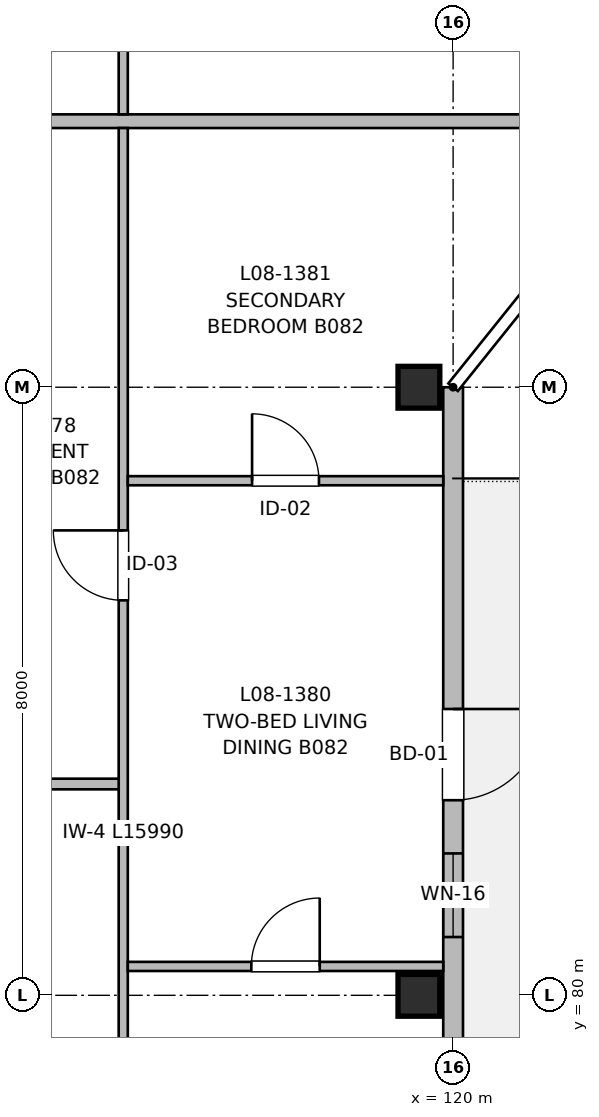
"""IFC4 building model, lengths in metres.
Left out: names, types, materials, properties, quantities, classifications, styles, units other than length and angle.
Written with IfcOpenShell. Run it as: python <this file> out.ifc"""

import sys

from ifc_helpers import new_model, si_unit, direction, frame, frame_2d, origin, origin_2d, place, context, subcontext, project, spatial, rectangle, extrude, element, fill, save


model = new_model("IFC4")
c1 = context("Model", 3, precision=1e-05, world=origin(), true_north=direction((0.0, 1.0)))
c2 = subcontext(c1, "Body", "Model", "MODEL_VIEW")
j1 = project(units=[si_unit("LENGTHUNIT", "METRE"), si_unit("PLANEANGLEUNIT", "RADIAN")], contexts=[c1])
p1 = place(None, origin())
s1 = spatial("IfcSite", under=j1, at=p1, CompositionType="ELEMENT")
p2 = place(p1, origin())
s2 = spatial("IfcBuilding", under=s1, at=p2, CompositionType="ELEMENT")
p3 = place(p2, frame((0.0, 0.0, 26.56)))
s3 = spatial("IfcBuildingStorey", under=s2, at=p3, CompositionType="ELEMENT", Elevation=26.56)
for number, where, z_axis, x_axis in (
    (1, (119.55, 80.0, 0.0), (0.0, 0.0, 1.0), (1.0, 0.0, 0.0)),
    (2, (119.55, 88.0, 0.0), (0.0, 0.0, 1.0), (1.0, 0.0, 0.0)),
):
    element("IfcColumn", number, at=place(p3, frame(where, z_axis=z_axis, x_axis=x_axis)), inside=s3, PredefinedType="COLUMN", context=c2, shape_type="SweptSolid", body=[
        extrude(rectangle(XDim=0.55, YDim=0.55, at=origin_2d()), origin(), (0.0, 0.0, 1.0), 3.2),
    ])
p4 = place(p3, frame((120.0, 88.0, 0.0), z_axis=(0.0, 0.0, 1.0), x_axis=(0.0, -1.0, 0.0)))
e3 = element("IfcWall", 3, at=p4, inside=s3, PredefinedType="SOLIDWALL", context=c2, shape_type="SweptSolid", body=[
    extrude(rectangle(XDim=29.0, YDim=0.26, at=frame_2d((14.5, 0.0))), origin(), (0.0, 0.0, 1.0), 2.98),
])
p5 = place(p4, frame((4.233, 0.0, 0.0)))
e4 = element("IfcOpeningElement", 4, at=p5, cuts=e3, PredefinedType="OPENING", context=c2, shape_type="SweptSolid", body=[
    extrude(rectangle(XDim=1.2, YDim=2.2, at=frame_2d((0.6, 1.1))), frame((0.0, 0.14, 0.0), z_axis=(0.0, -1.0, 0.0), x_axis=(1.0, 0.0, 0.0)), (0.0, 0.0, 1.0), 0.28),
])
p6 = place(p4, frame((6.133, 0.0, 0.62)))
e5 = element("IfcOpeningElement", 5, at=p6, cuts=e3, PredefinedType="OPENING", context=c2, shape_type="SweptSolid", body=[
    extrude(rectangle(XDim=1.1, YDim=1.6, at=frame_2d((0.55, 0.8))), frame((0.0, 0.14, 0.0), z_axis=(0.0, -1.0, 0.0), x_axis=(1.0, 0.0, 0.0)), (0.0, 0.0, 1.0), 0.28),
])
p7 = place(p4, frame((13.3, 0.0, 0.72)))
e6 = element("IfcOpeningElement", 6, at=p7, cuts=e3, PredefinedType="OPENING", context=c2, shape_type="SweptSolid", body=[
    extrude(rectangle(XDim=2.4, YDim=1.5, at=frame_2d((1.2, 0.75))), frame((0.0, 0.14, 0.0), z_axis=(0.0, -1.0, 0.0), x_axis=(1.0, 0.0, 0.0)), (0.0, 0.0, 1.0), 0.28),
])
p8 = place(p4, frame((24.717, 0.0, 0.82)))
e7 = element("IfcOpeningElement", 7, at=p8, cuts=e3, PredefinedType="OPENING", context=c2, shape_type="SweptSolid", body=[
    extrude(rectangle(XDim=1.5, YDim=1.4, at=frame_2d((0.75, 0.7))), frame((0.0, 0.14, 0.0), z_axis=(0.0, -1.0, 0.0), x_axis=(1.0, 0.0, 0.0)), (0.0, 0.0, 1.0), 0.28),
])
p9 = place(p4, frame((19.89, 0.0, 0.82)))
e8 = element("IfcOpeningElement", 8, at=p9, cuts=e3, PredefinedType="OPENING", context=c2, shape_type="SweptSolid", body=[
    extrude(rectangle(XDim=1.5, YDim=1.4, at=frame_2d((0.75, 0.7))), frame((0.0, 0.14, 0.0), z_axis=(0.0, -1.0, 0.0), x_axis=(1.0, 0.0, 0.0)), (0.0, 0.0, 1.0), 0.28),
])
p10 = place(p4, frame((9.375, 0.0, 0.82)))
e9 = element("IfcOpeningElement", 9, at=p10, cuts=e3, PredefinedType="OPENING", context=c2, shape_type="SweptSolid", body=[
    extrude(rectangle(XDim=1.5, YDim=1.4, at=frame_2d((0.75, 0.7))), frame((0.0, 0.14, 0.0), z_axis=(0.0, -1.0, 0.0), x_axis=(1.0, 0.0, 0.0)), (0.0, 0.0, 1.0), 0.28),
])
p11 = place(p3, frame((113.28, 91.5, 0.0), z_axis=(0.0, 0.0, 1.0), x_axis=(1.0, 0.0, 0.0)))
e10 = element("IfcWall", 10, at=p11, inside=s3, PredefinedType="PARTITIONING", context=c2, shape_type="SweptSolid", body=[
    extrude(rectangle(XDim=9.477, YDim=0.18, at=frame_2d((4.738, 0.0))), origin(), (0.0, 0.0, 1.0), 2.935),
])
p12 = place(p3, frame((115.66, 75.42, 0.0), z_axis=(0.0, 0.0, 1.0), x_axis=(0.0, 1.0, 0.0)))
e11 = element("IfcWall", 11, at=p12, inside=s3, PredefinedType="PARTITIONING", context=c2, shape_type="SweptSolid", body=[
    extrude(rectangle(XDim=15.99, YDim=0.12, at=frame_2d((7.995, 0.0))), origin(), (0.0, 0.0, 1.0), 2.935),
])
p13 = place(p12, frame((2.797, 0.0, 0.0)))
e12 = element("IfcOpeningElement", 12, at=p13, cuts=e11, PredefinedType="OPENING", context=c2, shape_type="SweptSolid", body=[
    extrude(rectangle(XDim=0.86, YDim=2.1, at=frame_2d((0.43, 1.05))), frame((0.0, 0.07, 0.0), z_axis=(0.0, -1.0, 0.0), x_axis=(1.0, 0.0, 0.0)), (0.0, 0.0, 1.0), 0.14),
])
p14 = place(p12, frame((9.776, 0.0, 0.0)))
e13 = element("IfcOpeningElement", 13, at=p14, cuts=e11, PredefinedType="OPENING", context=c2, shape_type="SweptSolid", body=[
    extrude(rectangle(XDim=0.92, YDim=2.1, at=frame_2d((0.46, 1.05))), frame((0.0, 0.07, 0.0), z_axis=(0.0, -1.0, 0.0), x_axis=(1.0, 0.0, 0.0)), (0.0, 0.0, 1.0), 0.14),
])
p15 = place(p3, frame((113.28, 82.78, 0.0), z_axis=(0.0, 0.0, 1.0), x_axis=(1.0, 0.0, 0.0)))
e14 = element("IfcWall", 14, at=p15, inside=s3, PredefinedType="PARTITIONING", context=c2, shape_type="SweptSolid", body=[
    extrude(rectangle(XDim=2.32, YDim=0.14, at=frame_2d((1.16, 0.0))), origin(), (0.0, 0.0, 1.0), 2.935),
])
p16 = place(p3, frame((115.72, 80.38, 0.0), z_axis=(0.0, 0.0, 1.0), x_axis=(1.0, 0.0, 0.0)))
e15 = element("IfcWall", 15, at=p16, inside=s3, PredefinedType="PARTITIONING", context=c2, shape_type="SweptSolid", body=[
    extrude(rectangle(XDim=4.15, YDim=0.12, at=frame_2d((2.075, 0.0))), origin(), (0.0, 0.0, 1.0), 2.935),
])
p17 = place(p16, frame((1.625, 0.0, 0.0)))
e16 = element("IfcOpeningElement", 16, at=p17, cuts=e15, PredefinedType="OPENING", context=c2, shape_type="SweptSolid", body=[
    extrude(rectangle(XDim=0.9, YDim=2.1, at=frame_2d((0.45, 1.05))), frame((0.0, 0.07, 0.0), z_axis=(0.0, -1.0, 0.0), x_axis=(1.0, 0.0, 0.0)), (0.0, 0.0, 1.0), 0.14),
])
p18 = place(p3, frame((115.72, 86.77, 0.0), z_axis=(0.0, 0.0, 1.0), x_axis=(1.0, 0.0, 0.0)))
e17 = element("IfcWall", 17, at=p18, inside=s3, PredefinedType="PARTITIONING", context=c2, shape_type="SweptSolid", body=[
    extrude(rectangle(XDim=4.15, YDim=0.12, at=frame_2d((2.075, 0.0))), origin(), (0.0, 0.0, 1.0), 2.935),
])
p19 = place(p18, frame((1.635, 0.0, 0.0)))
e18 = element("IfcOpeningElement", 18, at=p19, cuts=e17, PredefinedType="OPENING", context=c2, shape_type="SweptSolid", body=[
    extrude(rectangle(XDim=0.88, YDim=2.1, at=frame_2d((0.44, 1.05))), frame((0.0, 0.07, 0.0), z_axis=(0.0, -1.0, 0.0), x_axis=(1.0, 0.0, 0.0)), (0.0, 0.0, 1.0), 0.14),
])
p20 = place(p3, frame((115.66, 91.59, 0.0), z_axis=(0.0, 0.0, 1.0), x_axis=(0.0, 1.0, 0.0)))
e19 = element("IfcWall", 19, at=p20, inside=s3, PredefinedType="PARTITIONING", context=c2, shape_type="SweptSolid", body=[
    extrude(rectangle(XDim=15.13, YDim=0.12, at=frame_2d((7.565, 0.0))), origin(), (0.0, 0.0, 1.0), 2.68),
])
p21 = place(p20, frame((2.645, 0.0, 0.0)))
e20 = element("IfcOpeningElement", 20, at=p21, cuts=e19, PredefinedType="OPENING", context=c2, shape_type="SweptSolid", body=[
    extrude(rectangle(XDim=0.86, YDim=2.1, at=frame_2d((0.43, 1.05))), frame((0.0, 0.07, 0.0), z_axis=(0.0, -1.0, 0.0), x_axis=(1.0, 0.0, 0.0)), (0.0, 0.0, 1.0), 0.14),
])
p22 = place(p20, frame((9.548, 0.0, 0.0)))
e21 = element("IfcOpeningElement", 21, at=p22, cuts=e19, PredefinedType="OPENING", context=c2, shape_type="SweptSolid", body=[
    extrude(rectangle(XDim=0.92, YDim=2.1, at=frame_2d((0.46, 1.05))), frame((0.0, 0.07, 0.0), z_axis=(0.0, -1.0, 0.0), x_axis=(1.0, 0.0, 0.0)), (0.0, 0.0, 1.0), 0.14),
])
p23 = place(p5, origin())
e22 = element("IfcDoor", 22, at=p23, inside=s3, OperationType="SINGLE_SWING_LEFT", PredefinedType="DOOR", context=c2, shape_type="SweptSolid", body=[
    extrude(rectangle(XDim=1.2, YDim=2.2, at=frame_2d((0.6, 1.1))), frame((0.0, 0.025, 0.0), z_axis=(0.0, -1.0, 0.0), x_axis=(1.0, 0.0, 0.0)), (0.0, 0.0, 1.0), 0.05),
])
fill(e4, e22)
p24 = place(p6, origin())
e23 = element("IfcWindow", 23, at=p24, inside=s3, PartitioningType="SINGLE_PANEL", PredefinedType="WINDOW", context=c2, shape_type="SweptSolid", body=[
    extrude(rectangle(XDim=1.1, YDim=1.6, at=frame_2d((0.55, 0.8))), frame((0.0, 0.03, 0.0), z_axis=(0.0, -1.0, 0.0), x_axis=(1.0, 0.0, 0.0)), (0.0, 0.0, 1.0), 0.06),
])
fill(e5, e23)
p25 = place(p14, origin())
e24 = element("IfcDoor", 24, at=p25, inside=s3, OperationType="SINGLE_SWING_RIGHT", PredefinedType="DOOR", context=c2, shape_type="SweptSolid", body=[
    extrude(rectangle(XDim=0.92, YDim=2.1, at=frame_2d((0.46, 1.05))), frame((0.0, 0.025, 0.0), z_axis=(0.0, -1.0, 0.0), x_axis=(1.0, 0.0, 0.0)), (0.0, 0.0, 1.0), 0.05),
])
fill(e13, e24)
p26 = place(p17, origin())
e25 = element("IfcDoor", 25, at=p26, inside=s3, OperationType="SINGLE_SWING_RIGHT", PredefinedType="DOOR", context=c2, shape_type="SweptSolid", body=[
    extrude(rectangle(XDim=0.9, YDim=2.1, at=frame_2d((0.45, 1.05))), frame((0.0, 0.025, 0.0), z_axis=(0.0, -1.0, 0.0), x_axis=(1.0, 0.0, 0.0)), (0.0, 0.0, 1.0), 0.05),
])
fill(e16, e25)
p27 = place(p19, origin())
e26 = element("IfcDoor", 26, at=p27, inside=s3, OperationType="SINGLE_SWING_LEFT", PredefinedType="DOOR", context=c2, shape_type="SweptSolid", body=[
    extrude(rectangle(XDim=0.88, YDim=2.1, at=frame_2d((0.44, 1.05))), frame((0.0, 0.025, 0.0), z_axis=(0.0, -1.0, 0.0), x_axis=(1.0, 0.0, 0.0)), (0.0, 0.0, 1.0), 0.05),
])
fill(e18, e26)
save(model, sys.argv[1])
